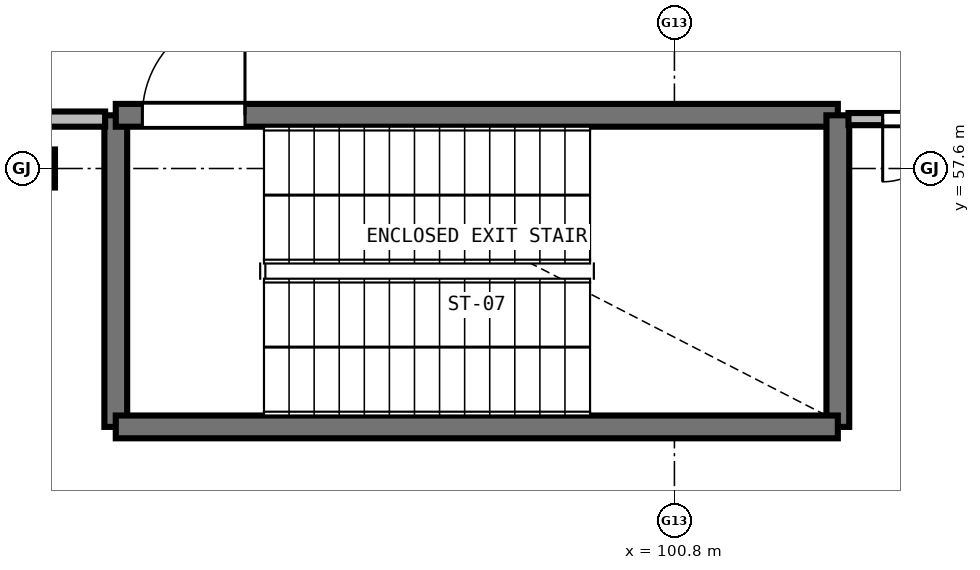
"""IFC4 building model, lengths in metres.
Left out: names, types, materials, properties, quantities, classifications, styles, units other than length and angle.
Written with IfcOpenShell. Run it as: python <this file> out.ifc"""

import sys

from ifc_helpers import new_model, si_unit, direction, frame, frame_2d, origin, origin_2d, place, context, subcontext, project, spatial, rectangle, extrude, element, fill, save


model = new_model("IFC4")
c1 = context("Model", 3, precision=1e-05, world=origin(), true_north=direction((0.0, 1.0)))
c2 = subcontext(c1, "Body", "Model", "MODEL_VIEW")
j1 = project(units=[si_unit("LENGTHUNIT", "METRE"), si_unit("PLANEANGLEUNIT", "RADIAN")], contexts=[c1])
p1 = place(None, origin())
s1 = spatial("IfcSite", under=j1, at=p1, CompositionType="ELEMENT")
p2 = place(p1, origin())
s2 = spatial("IfcBuilding", under=s1, at=p2, CompositionType="ELEMENT")
p3 = place(p2, frame((0.0, 0.0, 5.1)))
s3 = spatial("IfcBuildingStorey", under=s2, at=p3, CompositionType="ELEMENT", Elevation=5.1)
p4 = place(p3, frame((92.4, 57.6, 0.0), z_axis=(0.0, 0.0, 1.0), x_axis=(1.0, 0.0, 0.0)))
e1 = element("IfcColumn", 1, at=p4, inside=s3, PredefinedType="COLUMN", context=c2, shape_type="SweptSolid", body=[
    extrude(rectangle(XDim=0.5, YDim=0.5, at=origin_2d()), origin(), (0.0, 0.0, 1.0), 4.2),
])
p5 = place(p3, frame((93.45, 54.2, 0.0), z_axis=(0.0, 0.0, 1.0), x_axis=(0.0, 1.0, 0.0)))
e2 = element("IfcWall", 2, at=p5, inside=s3, PredefinedType="SHEAR", context=c2, shape_type="SweptSolid", body=[
    extrude(rectangle(XDim=4.1, YDim=0.3, at=frame_2d((2.05, 0.0))), origin(), (0.0, 0.0, 1.0), 3.92),
])
p6 = place(p3, frame((93.45, 58.3, 0.0), z_axis=(0.0, 0.0, 1.0), x_axis=(1.0, 0.0, 0.0)))
e3 = element("IfcWall", 3, at=p6, inside=s3, PredefinedType="SHEAR", context=c2, shape_type="SweptSolid", body=[
    extrude(rectangle(XDim=9.5, YDim=0.3, at=frame_2d((4.75, 0.0))), origin(), (0.0, 0.0, 1.0), 3.92),
])
p7 = place(p6, frame((0.35, 0.0, 0.0)))
e4 = element("IfcOpeningElement", 4, at=p7, cuts=e3, PredefinedType="OPENING", context=c2, shape_type="SweptSolid", body=[
    extrude(rectangle(XDim=1.35, YDim=2.2, at=frame_2d((0.675, 1.1))), frame((0.0, 0.16, 0.0), z_axis=(0.0, -1.0, 0.0), x_axis=(1.0, 0.0, 0.0)), (0.0, 0.0, 1.0), 0.32),
])
p8 = place(p3, frame((102.95, 58.3, 0.0), z_axis=(0.0, 0.0, 1.0), x_axis=(0.0, -1.0, 0.0)))
e5 = element("IfcWall", 5, at=p8, inside=s3, PredefinedType="SHEAR", context=c2, shape_type="SweptSolid", body=[
    extrude(rectangle(XDim=4.1, YDim=0.3, at=frame_2d((2.05, 0.0))), origin(), (0.0, 0.0, 1.0), 3.92),
])
p9 = place(p3, frame((102.95, 54.2, 0.0), z_axis=(0.0, 0.0, 1.0), x_axis=(-1.0, 0.0, 0.0)))
e6 = element("IfcWall", 6, at=p9, inside=s3, PredefinedType="SHEAR", context=c2, shape_type="SweptSolid", body=[
    extrude(rectangle(XDim=9.5, YDim=0.3, at=frame_2d((4.75, 0.0))), origin(), (0.0, 0.0, 1.0), 3.92),
])
p10 = place(p3, frame((134.18, 58.25, 0.0), z_axis=(0.0, 0.0, 1.0), x_axis=(-1.0, 0.0, 0.0)))
e7 = element("IfcWall", 7, at=p10, inside=s3, PredefinedType="PARTITIONING", context=c2, shape_type="SweptSolid", body=[
    extrude(rectangle(XDim=31.09, YDim=0.16, at=frame_2d((15.545, 0.0))), origin(), (0.0, 0.0, 1.0), 3.305),
])
p11 = place(p10, frame((28.99, 0.0, 0.0)))
e8 = element("IfcOpeningElement", 8, at=p11, cuts=e7, PredefinedType="OPENING", context=c2, shape_type="SweptSolid", body=[
    extrude(rectangle(XDim=1.65, YDim=2.2, at=frame_2d((0.825, 1.1))), frame((0.0, 0.09, 0.0), z_axis=(0.0, -1.0, 0.0), x_axis=(1.0, 0.0, 0.0)), (0.0, 0.0, 1.0), 0.18),
])
p12 = place(p3, frame((93.31, 58.25, 0.0), z_axis=(0.0, 0.0, 1.0), x_axis=(-1.0, 0.0, 0.0)))
e9 = element("IfcWall", 9, at=p12, inside=s3, PredefinedType="SOLIDWALL", context=c2, shape_type="SweptSolid", body=[
    extrude(rectangle(XDim=0.91, YDim=0.2, at=frame_2d((0.455, 0.0))), origin(), (0.0, 0.0, 1.0), 3.305),
])
p13 = place(p7, origin())
e10 = element("IfcDoor", 10, at=p13, inside=s3, OperationType="SINGLE_SWING_RIGHT", PredefinedType="DOOR", context=c2, shape_type="SweptSolid", body=[
    extrude(rectangle(XDim=1.35, YDim=2.2, at=frame_2d((0.675, 1.1))), frame((0.0, 0.025, 0.0), z_axis=(0.0, -1.0, 0.0), x_axis=(1.0, 0.0, 0.0)), (0.0, 0.0, 1.0), 0.05),
])
fill(e4, e10)
p14 = place(p11, origin())
e11 = element("IfcDoor", 11, at=p14, inside=s3, OperationType="DOUBLE_DOOR_SINGLE_SWING", PredefinedType="DOOR", context=c2, shape_type="SweptSolid", body=[
    extrude(rectangle(XDim=1.65, YDim=2.2, at=frame_2d((0.825, 1.1))), frame((0.0, 0.025, 0.0), z_axis=(0.0, -1.0, 0.0), x_axis=(1.0, 0.0, 0.0)), (0.0, 0.0, 1.0), 0.05),
])
fill(e8, e11)
save(model, sys.argv[1])
